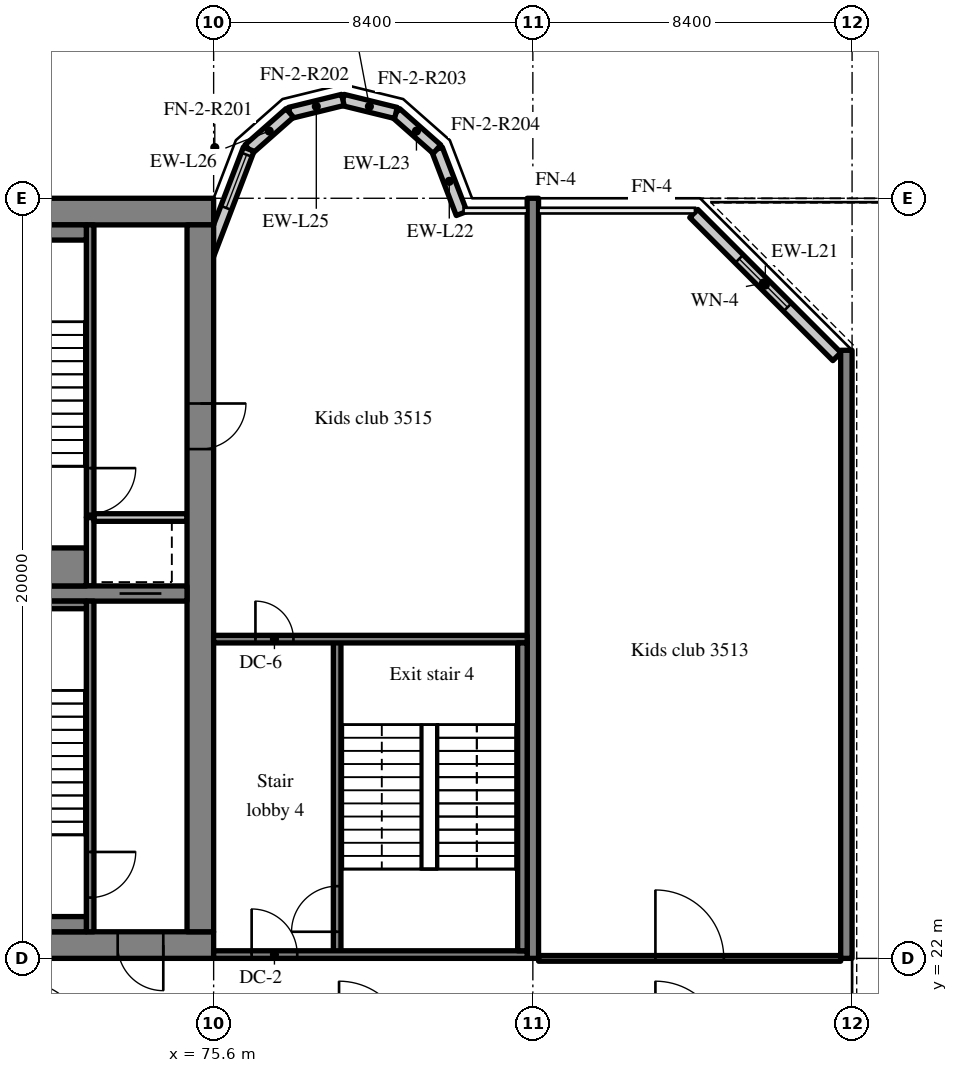
"""IFC4 building model, lengths in metres.
Left out: names, types, materials, properties, quantities, classifications, styles, units other than length and angle.
Written with IfcOpenShell. Run it as: python <this file> out.ifc"""

import sys

from ifc_helpers import new_model, si_unit, direction, frame, frame_2d, origin, place, context, subcontext, project, spatial, rectangle, extrude, source, transform, mapped, element, fill, save


model = new_model("IFC4")
c1 = context("Model", 3, precision=1e-05, world=origin(), true_north=direction((0.0, 1.0)))
c2 = subcontext(c1, "Body", "Model", "MODEL_VIEW")
j1 = project(units=[si_unit("LENGTHUNIT", "METRE"), si_unit("PLANEANGLEUNIT", "RADIAN")], contexts=[c1])
p1 = place(None, origin())
s1 = spatial("IfcSite", under=j1, at=p1, CompositionType="ELEMENT")
p2 = place(p1, origin())
s2 = spatial("IfcBuilding", under=s1, at=p2, CompositionType="ELEMENT")
p3 = place(p2, frame((0.0, 0.0, 146.2)))
s3 = spatial("IfcBuildingStorey", under=s2, at=p3, CompositionType="ELEMENT", Elevation=146.2)
m1 = source(origin(), c2, "Body", "SweptSolid", [
    extrude(rectangle(XDim=50.4, YDim=0.7, at=frame_2d((25.2, 0.0))), origin(), (0.0, 0.0, 1.0), 5.12),
])
p4 = place(p3, frame((25.2, 22.35, 0.0), z_axis=(0.0, 0.0, 1.0), x_axis=(1.0, 0.0, 0.0)))
e1 = element("IfcWall", 1, at=p4, inside=s3, PredefinedType="SHEAR", context=c2, shape_type="MappedRepresentation", body=[
    mapped(m1, transform((0.0, 0.0, 0.0), scale=1.0)),
])
m2 = source(origin(), c2, "Body", "SweptSolid", [
    extrude(rectangle(XDim=1.8, YDim=2.1, at=frame_2d((0.9, 1.05))), frame((0.0, 0.36, 0.0), z_axis=(0.0, -1.0, 0.0), x_axis=(1.0, 0.0, 0.0)), (0.0, 0.0, 1.0), 0.72),
])
p5 = place(p4, frame((15.9, 0.0, 0.0)))
e2 = element("IfcOpeningElement", 2, at=p5, cuts=e1, PredefinedType="OPENING", context=c2, shape_type="MappedRepresentation", body=[
    mapped(m2, transform((0.0, 0.0, 0.0), scale=1.0)),
])
p6 = place(p4, frame((32.7, 0.0, 0.0)))
e3 = element("IfcOpeningElement", 3, at=p6, cuts=e1, PredefinedType="OPENING", context=c2, shape_type="MappedRepresentation", body=[
    mapped(m2, transform((0.0, 0.0, 0.0), scale=1.0)),
])
m3 = source(origin(), c2, "Body", "SweptSolid", [
    extrude(rectangle(XDim=1.2, YDim=2.1, at=frame_2d((0.6, 1.05))), frame((0.0, 0.36, 0.0), z_axis=(0.0, -1.0, 0.0), x_axis=(1.0, 0.0, 0.0)), (0.0, 0.0, 1.0), 0.72),
])
p7 = place(p4, frame((6.475, 0.0, 0.0)))
e4 = element("IfcOpeningElement", 4, at=p7, cuts=e1, PredefinedType="OPENING", context=c2, shape_type="MappedRepresentation", body=[
    mapped(m3, transform((0.0, 0.0, 0.0), scale=1.0)),
])
p8 = place(p4, frame((47.875, 0.0, 0.0)))
e5 = element("IfcOpeningElement", 5, at=p8, cuts=e1, PredefinedType="OPENING", context=c2, shape_type="MappedRepresentation", body=[
    mapped(m3, transform((0.0, 0.0, 0.0), scale=1.0)),
])
p9 = place(p3, frame((25.2, 41.65, 0.0), z_axis=(0.0, 0.0, 1.0), x_axis=(1.0, 0.0, 0.0)))
e6 = element("IfcWall", 6, at=p9, inside=s3, PredefinedType="SHEAR", context=c2, shape_type="MappedRepresentation", body=[
    mapped(m1, transform((0.0, 0.0, 0.0), scale=1.0)),
])
m4 = source(origin(), c2, "Body", "SweptSolid", [
    extrude(rectangle(XDim=18.6, YDim=0.7, at=frame_2d((9.3, 0.0))), origin(), (0.0, 0.0, 1.0), 5.12),
])
p10 = place(p3, frame((75.25, 22.7, 0.0), z_axis=(0.0, 0.0, 1.0), x_axis=(0.0, 1.0, 0.0)))
e7 = element("IfcWall", 7, at=p10, inside=s3, PredefinedType="SHEAR", context=c2, shape_type="MappedRepresentation", body=[
    mapped(m4, transform((0.0, 0.0, 0.0), scale=1.0)),
])
p11 = place(p10, frame((12.7, 0.0, 0.0)))
e8 = element("IfcOpeningElement", 8, at=p11, cuts=e7, PredefinedType="OPENING", context=c2, shape_type="MappedRepresentation", body=[
    mapped(m3, transform((0.0, 0.0, 0.0), scale=1.0)),
])
m5 = source(origin(), c2, "Body", "SweptSolid", [
    extrude(rectangle(XDim=7.5, YDim=0.4, at=frame_2d((3.75, 0.0))), origin(), (0.0, 0.0, 1.0), 5.12),
])
p12 = place(p3, frame((67.4, 31.6, 0.0), z_axis=(0.0, 0.0, 1.0), x_axis=(1.0, 0.0, 0.0)))
e9 = element("IfcWall", 9, at=p12, inside=s3, PredefinedType="SHEAR", context=c2, shape_type="MappedRepresentation", body=[
    mapped(m5, transform((0.0, 0.0, 0.0), scale=1.0)),
])
m6 = source(origin(), c2, "Body", "SweptSolid", [
    extrude(rectangle(XDim=1.1, YDim=2.1, at=frame_2d((0.55, 1.05))), frame((0.0, 0.21, 0.0), z_axis=(0.0, -1.0, 0.0), x_axis=(1.0, 0.0, 0.0)), (0.0, 0.0, 1.0), 0.42),
])
p13 = place(p12, frame((5.725, 0.0, 0.0)))
e10 = element("IfcOpeningElement", 10, at=p13, cuts=e9, PredefinedType="OPENING", context=c2, shape_type="MappedRepresentation", body=[
    mapped(m6, transform((0.0, 0.0, 0.0), scale=1.0)),
])
m7 = source(origin(), c2, "Body", "SweptSolid", [
    extrude(rectangle(XDim=20.0, YDim=0.3, at=frame_2d((10.0, 0.0))), origin(), (0.0, 0.0, 1.0), 5.12),
])
p14 = place(p3, frame((84.0, 22.0, 0.0), z_axis=(0.0, 0.0, 1.0), x_axis=(0.0, 1.0, 0.0)))
e11 = element("IfcWall", 11, at=p14, inside=s3, PredefinedType="SHEAR", context=c2, shape_type="MappedRepresentation", body=[
    mapped(m7, transform((0.0, 0.0, 0.0), scale=1.0)),
])
m8 = source(origin(), c2, "Body", "SweptSolid", [
    extrude(rectangle(XDim=16.0, YDim=0.3, at=frame_2d((8.0, 0.0))), origin(), (0.0, 0.0, 1.0), 5.12),
])
p15 = place(p3, frame((92.25, 22.0, 0.0), z_axis=(0.0, 0.0, 1.0), x_axis=(0.0, 1.0, 0.0)))
e12 = element("IfcWall", 12, at=p15, inside=s3, PredefinedType="SHEAR", context=c2, shape_type="MappedRepresentation", body=[
    mapped(m8, transform((0.0, 0.0, 0.0), scale=1.0)),
])
m9 = source(origin(), c2, "Body", "SweptSolid", [
    extrude(rectangle(XDim=5.326, YDim=0.3, at=frame_2d((2.663, 0.0))), origin(), (0.0, 0.0, 1.0), 5.12),
])
p16 = place(p3, frame((92.0, 37.834, 0.0), z_axis=(0.0, 0.0, 1.0), x_axis=(-0.707083859269, 0.707129702361, 0.0)))
e13 = element("IfcWall", 13, at=p16, inside=s3, PredefinedType="SOLIDWALL", context=c2, shape_type="MappedRepresentation", body=[
    mapped(m9, transform((0.0, 0.0, 0.0), scale=1.0)),
])
m10 = source(origin(), c2, "Body", "SweptSolid", [
    extrude(rectangle(XDim=1.8, YDim=1.5, at=frame_2d((0.9, 0.75))), frame((0.0, 0.16, 0.0), z_axis=(0.0, -1.0, 0.0), x_axis=(1.0, 0.0, 0.0)), (0.0, 0.0, 1.0), 0.32),
])
p17 = place(p16, frame((1.836, 0.0, 0.9)))
e14 = element("IfcOpeningElement", 14, at=p17, cuts=e13, PredefinedType="OPENING", context=c2, shape_type="MappedRepresentation", body=[
    mapped(m10, transform((0.0, 0.0, 0.0), scale=1.0)),
])
m11 = source(origin(), c2, "Body", "SweptSolid", [
    extrude(rectangle(XDim=1.812, YDim=0.3, at=frame_2d((0.906, 0.0))), origin(), (0.0, 0.0, 1.0), 5.12),
])
p18 = place(p3, frame((82.125, 41.6, 0.0), z_axis=(0.0, 0.0, 1.0), x_axis=(-0.357877270961, 0.93376863244, 0.0)))
e15 = element("IfcWall", 15, at=p18, inside=s3, PredefinedType="SOLIDWALL", context=c2, shape_type="MappedRepresentation", body=[
    mapped(m11, transform((0.0, 0.0, 0.0), scale=1.0)),
])
m12 = source(origin(), c2, "Body", "SweptSolid", [
    extrude(rectangle(XDim=1.44, YDim=0.3, at=frame_2d((0.72, 0.0))), origin(), (0.0, 0.0, 1.0), 5.12),
])
p19 = place(p3, frame((81.477, 43.292, 0.0), z_axis=(0.0, 0.0, 1.0), x_axis=(-0.74957555648, 0.661918790432, 0.0)))
e16 = element("IfcWall", 16, at=p19, inside=s3, PredefinedType="SOLIDWALL", context=c2, shape_type="MappedRepresentation", body=[
    mapped(m12, transform((0.0, 0.0, 0.0), scale=1.0)),
])
m13 = source(origin(), c2, "Body", "SweptSolid", [
    extrude(rectangle(XDim=1.439, YDim=0.3, at=frame_2d((0.719, 0.0))), origin(), (0.0, 0.0, 1.0), 5.12),
])
for number, where, z_axis, x_axis in (
    (17, (80.397, 44.245, 0.0), (0.0, 0.0, 1.0), (-0.971, 0.238, 0.0)),
    (18, (79.0, 44.588, 0.0), (0.0, 0.0, 1.0), (-0.971, -0.238, 0.0)),
):
    element("IfcWall", number, at=place(p3, frame(where, z_axis=z_axis, x_axis=x_axis)), inside=s3, PredefinedType="SOLIDWALL", context=c2, shape_type="MappedRepresentation", body=[
        mapped(m13, transform((0.0, 0.0, 0.0), scale=1.0)),
    ])
p20 = place(p3, frame((77.603, 44.245, 0.0), z_axis=(0.0, 0.0, 1.0), x_axis=(-0.74957555648, -0.661918790432, 0.0)))
e19 = element("IfcWall", 19, at=p20, inside=s3, PredefinedType="SOLIDWALL", context=c2, shape_type="MappedRepresentation", body=[
    mapped(m12, transform((0.0, 0.0, 0.0), scale=1.0)),
])
m14 = source(origin(), c2, "Body", "SweptSolid", [
    extrude(rectangle(XDim=3.559, YDim=0.3, at=frame_2d((1.78, 0.0))), origin(), (0.0, 0.0, 1.0), 5.12),
])
p21 = place(p3, frame((76.523, 43.292, 0.0), z_axis=(0.0, 0.0, 1.0), x_axis=(-0.35779745313, -0.933799219604, 0.0)))
e20 = element("IfcWall", 20, at=p21, inside=s3, PredefinedType="SOLIDWALL", context=c2, shape_type="MappedRepresentation", body=[
    mapped(m14, transform((0.0, 0.0, 0.0), scale=1.0)),
])
m15 = source(origin(), c2, "Body", "SweptSolid", [
    extrude(rectangle(XDim=1.5, YDim=2.0, at=frame_2d((0.75, 1.0))), frame((0.0, 0.16, 0.0), z_axis=(0.0, -1.0, 0.0), x_axis=(1.0, 0.0, 0.0)), (0.0, 0.0, 1.0), 0.32),
])
p22 = place(p21, frame((0.156, 0.0, 0.9)))
e21 = element("IfcOpeningElement", 21, at=p22, cuts=e20, PredefinedType="OPENING", context=c2, shape_type="MappedRepresentation", body=[
    mapped(m15, transform((0.0, 0.0, 0.0), scale=1.0)),
])
m16 = source(origin(), c2, "Body", "SweptSolid", [
    extrude(rectangle(XDim=8.7, YDim=0.2, at=frame_2d((4.35, 0.0))), origin(), (0.0, 0.0, 1.0), 5.12),
])
p23 = place(p3, frame((72.35, 22.7, 0.0), z_axis=(0.0, 0.0, 1.0), x_axis=(0.0, 1.0, 0.0)))
e22 = element("IfcWall", 22, at=p23, inside=s3, PredefinedType="SOLIDWALL", context=c2, shape_type="MappedRepresentation", body=[
    mapped(m16, transform((0.0, 0.0, 0.0), scale=1.0)),
])
m17 = source(origin(), c2, "Body", "SweptSolid", [
    extrude(rectangle(XDim=1.2, YDim=2.1, at=frame_2d((0.6, 1.05))), frame((0.0, 0.11, 0.0), z_axis=(0.0, -1.0, 0.0), x_axis=(1.0, 0.0, 0.0)), (0.0, 0.0, 1.0), 0.22),
])
p24 = place(p23, frame((0.9, 0.0, 0.0)))
e23 = element("IfcOpeningElement", 23, at=p24, cuts=e22, PredefinedType="OPENING", context=c2, shape_type="MappedRepresentation", body=[
    mapped(m17, transform((0.0, 0.0, 0.0), scale=1.0)),
])
m18 = source(origin(), c2, "Body", "SweptSolid", [
    extrude(rectangle(XDim=1.8, YDim=0.2, at=frame_2d((0.9, 0.0))), origin(), (0.0, 0.0, 1.0), 5.12),
])
p25 = place(p3, frame((72.35, 31.8, 0.0), z_axis=(0.0, 0.0, 1.0), x_axis=(0.0, 1.0, 0.0)))
e24 = element("IfcWall", 24, at=p25, inside=s3, PredefinedType="SOLIDWALL", context=c2, shape_type="MappedRepresentation", body=[
    mapped(m18, transform((0.0, 0.0, 0.0), scale=1.0)),
])
m19 = source(origin(), c2, "Body", "SweptSolid", [
    extrude(rectangle(XDim=2.45, YDim=0.2, at=frame_2d((1.225, 0.0))), origin(), (0.0, 0.0, 1.0), 5.12),
])
p26 = place(p3, frame((72.45, 33.6, 0.0), z_axis=(0.0, 0.0, 1.0), x_axis=(1.0, 0.0, 0.0)))
e25 = element("IfcWall", 25, at=p26, inside=s3, PredefinedType="SOLIDWALL", context=c2, shape_type="MappedRepresentation", body=[
    mapped(m19, transform((0.0, 0.0, 0.0), scale=1.0)),
])
m20 = source(origin(), c2, "Body", "SweptSolid", [
    extrude(rectangle(XDim=7.7, YDim=0.2, at=frame_2d((3.85, 0.0))), origin(), (0.0, 0.0, 1.0), 5.12),
])
p27 = place(p3, frame((72.35, 33.6, 0.0), z_axis=(0.0, 0.0, 1.0), x_axis=(0.0, 1.0, 0.0)))
e26 = element("IfcWall", 26, at=p27, inside=s3, PredefinedType="SOLIDWALL", context=c2, shape_type="MappedRepresentation", body=[
    mapped(m20, transform((0.0, 0.0, 0.0), scale=1.0)),
])
p28 = place(p27, frame((0.1, 0.0, 0.0)))
e27 = element("IfcOpeningElement", 27, at=p28, cuts=e26, PredefinedType="OPENING", context=c2, shape_type="MappedRepresentation", body=[
    mapped(m17, transform((0.0, 0.0, 0.0), scale=1.0)),
])
m21 = source(origin(), c2, "Body", "SweptSolid", [
    extrude(rectangle(XDim=8.3, YDim=0.2, at=frame_2d((4.15, 0.0))), origin(), (0.0, 0.0, 1.0), 5.12),
])
p29 = place(p3, frame((78.85, 22.1, 0.0), z_axis=(0.0, 0.0, 1.0), x_axis=(0.0, 1.0, 0.0)))
e28 = element("IfcWall", 28, at=p29, inside=s3, PredefinedType="SOLIDWALL", context=c2, shape_type="MappedRepresentation", body=[
    mapped(m21, transform((0.0, 0.0, 0.0), scale=1.0)),
])
p30 = place(p29, frame((0.6, 0.0, 0.0)))
e29 = element("IfcOpeningElement", 29, at=p30, cuts=e28, PredefinedType="OPENING", context=c2, shape_type="MappedRepresentation", body=[
    mapped(m17, transform((0.0, 0.0, 0.0), scale=1.0)),
])
m22 = source(origin(), c2, "Body", "SweptSolid", [
    extrude(rectangle(XDim=8.25, YDim=0.2, at=frame_2d((4.125, 0.0))), origin(), (0.0, 0.0, 1.0), 5.12),
])
p31 = place(p3, frame((83.85, 22.1, 0.0), z_axis=(0.0, 0.0, 1.0), x_axis=(-1.0, 0.0, 0.0)))
e30 = element("IfcWall", 30, at=p31, inside=s3, PredefinedType="SOLIDWALL", context=c2, shape_type="MappedRepresentation", body=[
    mapped(m22, transform((0.0, 0.0, 0.0), scale=1.0)),
])
p32 = place(p31, frame((6.05, 0.0, 0.0)))
e31 = element("IfcOpeningElement", 31, at=p32, cuts=e30, PredefinedType="OPENING", context=c2, shape_type="MappedRepresentation", body=[
    mapped(m17, transform((0.0, 0.0, 0.0), scale=1.0)),
])
p33 = place(p3, frame((83.85, 30.4, 0.0), z_axis=(0.0, 0.0, 1.0), x_axis=(-1.0, 0.0, 0.0)))
e32 = element("IfcWall", 32, at=p33, inside=s3, PredefinedType="SOLIDWALL", context=c2, shape_type="MappedRepresentation", body=[
    mapped(m22, transform((0.0, 0.0, 0.0), scale=1.0)),
])
m23 = source(origin(), c2, "Body", "SweptSolid", [
    extrude(rectangle(XDim=1.0, YDim=2.1, at=frame_2d((0.5, 1.05))), frame((0.0, 0.11, 0.0), z_axis=(0.0, -1.0, 0.0), x_axis=(1.0, 0.0, 0.0)), (0.0, 0.0, 1.0), 0.22),
])
p34 = place(p33, frame((6.15, 0.0, 0.0)))
e33 = element("IfcOpeningElement", 33, at=p34, cuts=e32, PredefinedType="OPENING", context=c2, shape_type="MappedRepresentation", body=[
    mapped(m23, transform((0.0, 0.0, 0.0), scale=1.0)),
])
m24 = source(origin(), c2, "Body", "SweptSolid", [
    extrude(rectangle(XDim=4.85, YDim=0.4, at=frame_2d((2.425, 0.0))), origin(), (0.0, 0.0, 1.0), 5.12),
])
p35 = place(p3, frame((67.4, 22.9, 0.0), z_axis=(0.0, 0.0, 1.0), x_axis=(1.0, 0.0, 0.0)))
e34 = element("IfcWall", 34, at=p35, inside=s3, PredefinedType="SOLIDWALL", context=c2, shape_type="MappedRepresentation", body=[
    mapped(m24, transform((0.0, 0.0, 0.0), scale=1.0)),
])
m25 = source(origin(), c2, "Body", "SweptSolid", [
    extrude(rectangle(XDim=4.85, YDim=0.2, at=frame_2d((2.425, 0.0))), origin(), (0.0, 0.0, 1.0), 5.12),
])
p36 = place(p3, frame((67.4, 31.3, 0.0), z_axis=(0.0, 0.0, 1.0), x_axis=(1.0, 0.0, 0.0)))
e35 = element("IfcWall", 35, at=p36, inside=s3, PredefinedType="SOLIDWALL", context=c2, shape_type="MappedRepresentation", body=[
    mapped(m25, transform((0.0, 0.0, 0.0), scale=1.0)),
])
p37 = place(p3, frame((67.4, 41.1, 0.0), z_axis=(0.0, 0.0, 1.0), x_axis=(1.0, 0.0, 0.0)))
e36 = element("IfcWall", 36, at=p37, inside=s3, PredefinedType="SOLIDWALL", context=c2, shape_type="MappedRepresentation", body=[
    mapped(m24, transform((0.0, 0.0, 0.0), scale=1.0)),
])
m26 = source(origin(), c2, "Body", "SweptSolid", [
    extrude(rectangle(XDim=4.85, YDim=1.0, at=frame_2d((2.425, 0.0))), origin(), (0.0, 0.0, 1.0), 5.12),
])
p38 = place(p3, frame((67.4, 32.3, 0.0), z_axis=(0.0, 0.0, 1.0), x_axis=(1.0, 0.0, 0.0)))
e37 = element("IfcWall", 37, at=p38, inside=s3, PredefinedType="SOLIDWALL", context=c2, shape_type="MappedRepresentation", body=[
    mapped(m26, transform((0.0, 0.0, 0.0), scale=1.0)),
])
m27 = source(origin(), c2, "Body", "SweptSolid", [
    extrude(rectangle(XDim=8.1, YDim=0.25, at=frame_2d((4.05, 0.0))), origin(), (0.0, 0.0, 1.0), 5.12),
])
p39 = place(p3, frame((83.725, 22.2, 0.0), z_axis=(0.0, 0.0, 1.0), x_axis=(0.0, 1.0, 0.0)))
e38 = element("IfcWall", 38, at=p39, inside=s3, PredefinedType="SOLIDWALL", context=c2, shape_type="MappedRepresentation", body=[
    mapped(m27, transform((0.0, 0.0, 0.0), scale=1.0)),
])
m28 = source(origin(), c2, "Body", "SweptSolid", [
    extrude(rectangle(XDim=7.95, YDim=0.15, at=frame_2d((3.975, 0.0))), origin(), (0.0, 0.0, 1.0), 4.42),
])
p40 = place(p3, frame((84.15, 22.0, 0.0), z_axis=(0.0, 0.0, 1.0), x_axis=(1.0, 0.0, 0.0)))
e39 = element("IfcWall", 39, at=p40, inside=s3, PredefinedType="PARTITIONING", context=c2, shape_type="MappedRepresentation", body=[
    mapped(m28, transform((0.0, 0.0, 0.0), scale=1.0)),
])
m29 = source(origin(), c2, "Body", "SweptSolid", [
    extrude(rectangle(XDim=1.8, YDim=2.1, at=frame_2d((0.9, 1.05))), frame((0.0, 0.085, 0.0), z_axis=(0.0, -1.0, 0.0), x_axis=(1.0, 0.0, 0.0)), (0.0, 0.0, 1.0), 0.17),
])
p41 = place(p40, frame((3.075, 0.0, 0.0)))
e40 = element("IfcOpeningElement", 40, at=p41, cuts=e39, PredefinedType="OPENING", context=c2, shape_type="MappedRepresentation", body=[
    mapped(m29, transform((0.0, 0.0, 0.0), scale=1.0)),
])
m30 = source(origin(), c2, "Body", "SweptSolid", [
    extrude(rectangle(XDim=1.8, YDim=1.5, at=frame_2d((0.9, 0.75))), frame((0.0, 0.03, 0.0), z_axis=(0.0, -1.0, 0.0), x_axis=(1.0, 0.0, 0.0)), (0.0, 0.0, 1.0), 0.06),
])
p42 = place(p17, origin())
e41 = element("IfcWindow", 41, at=p42, inside=s3, PartitioningType="SINGLE_PANEL", PredefinedType="WINDOW", context=c2, shape_type="MappedRepresentation", body=[
    mapped(m30, transform((0.0, 0.0, 0.0), scale=1.0)),
])
fill(e14, e41)
m31 = source(origin(), c2, "Body", "SweptSolid", [
    extrude(rectangle(XDim=1.5, YDim=2.0, at=frame_2d((0.75, 1.0))), frame((0.0, 0.03, 0.0), z_axis=(0.0, -1.0, 0.0), x_axis=(1.0, 0.0, 0.0)), (0.0, 0.0, 1.0), 0.06),
])
p43 = place(p22, origin())
e42 = element("IfcWindow", 42, at=p43, inside=s3, PartitioningType="SINGLE_PANEL", PredefinedType="WINDOW", context=c2, shape_type="MappedRepresentation", body=[
    mapped(m31, transform((0.0, 0.0, 0.0), scale=1.0)),
])
fill(e21, e42)
m32 = source(origin(), c2, "Body", "SweptSolid", [
    extrude(rectangle(XDim=1.2, YDim=2.1, at=frame_2d((0.6, 1.05))), frame((0.0, 0.025, 0.0), z_axis=(0.0, -1.0, 0.0), x_axis=(1.0, 0.0, 0.0)), (0.0, 0.0, 1.0), 0.05),
])
p44 = place(p24, origin())
e43 = element("IfcDoor", 43, at=p44, inside=s3, OperationType="SINGLE_SWING_RIGHT", PredefinedType="DOOR", context=c2, shape_type="MappedRepresentation", body=[
    mapped(m32, transform((0.0, 0.0, 0.0), scale=1.0)),
])
fill(e23, e43)
m33 = source(origin(), c2, "Body", "SweptSolid", [
    extrude(rectangle(XDim=1.2, YDim=2.1, at=frame_2d((0.6, 1.05))), frame((0.0, 0.275, 0.0), z_axis=(0.0, -1.0, 0.0), x_axis=(1.0, 0.0, 0.0)), (0.0, 0.0, 1.0), 0.05),
])
p45 = place(p8, origin())
e44 = element("IfcDoor", 44, at=p45, inside=s3, OperationType="SINGLE_SWING_RIGHT", PredefinedType="DOOR", context=c2, shape_type="MappedRepresentation", body=[
    mapped(m33, transform((0.0, 0.0, 0.0), scale=1.0)),
])
fill(e5, e44)
m34 = source(origin(), c2, "Body", "SweptSolid", [
    extrude(rectangle(XDim=1.1, YDim=2.1, at=frame_2d((0.55, 1.05))), frame((0.0, 0.025, 0.0), z_axis=(0.0, -1.0, 0.0), x_axis=(1.0, 0.0, 0.0)), (0.0, 0.0, 1.0), 0.05),
])
p46 = place(p13, origin())
e45 = element("IfcDoor", 45, at=p46, inside=s3, OperationType="SLIDING_TO_RIGHT", PredefinedType="DOOR", context=c2, shape_type="MappedRepresentation", body=[
    mapped(m34, transform((0.0, 0.0, 0.0), scale=1.0)),
])
fill(e10, e45)
p47 = place(p28, origin())
e46 = element("IfcDoor", 46, at=p47, inside=s3, OperationType="SINGLE_SWING_RIGHT", PredefinedType="DOOR", context=c2, shape_type="MappedRepresentation", body=[
    mapped(m32, transform((0.0, 0.0, 0.0), scale=1.0)),
])
fill(e27, e46)
p48 = place(p11, origin())
e47 = element("IfcDoor", 47, at=p48, inside=s3, OperationType="SINGLE_SWING_RIGHT", PredefinedType="DOOR", context=c2, shape_type="MappedRepresentation", body=[
    mapped(m32, transform((0.0, 0.0, 0.0), scale=1.0)),
])
fill(e8, e47)
p49 = place(p30, origin())
e48 = element("IfcDoor", 48, at=p49, inside=s3, OperationType="SINGLE_SWING_LEFT", PredefinedType="DOOR", context=c2, shape_type="MappedRepresentation", body=[
    mapped(m32, transform((0.0, 0.0, 0.0), scale=1.0)),
])
fill(e29, e48)
p50 = place(p32, origin())
e49 = element("IfcDoor", 49, at=p50, inside=s3, OperationType="SINGLE_SWING_RIGHT", PredefinedType="DOOR", context=c2, shape_type="MappedRepresentation", body=[
    mapped(m32, transform((0.0, 0.0, 0.0), scale=1.0)),
])
fill(e31, e49)
m35 = source(origin(), c2, "Body", "SweptSolid", [
    extrude(rectangle(XDim=1.0, YDim=2.1, at=frame_2d((0.5, 1.05))), frame((0.0, 0.025, 0.0), z_axis=(0.0, -1.0, 0.0), x_axis=(1.0, 0.0, 0.0)), (0.0, 0.0, 1.0), 0.05),
])
p51 = place(p34, origin())
e50 = element("IfcDoor", 50, at=p51, inside=s3, OperationType="SINGLE_SWING_RIGHT", PredefinedType="DOOR", context=c2, shape_type="MappedRepresentation", body=[
    mapped(m35, transform((0.0, 0.0, 0.0), scale=1.0)),
])
fill(e33, e50)
m36 = source(origin(), c2, "Body", "SweptSolid", [
    extrude(rectangle(XDim=1.8, YDim=2.1, at=frame_2d((0.9, 1.05))), frame((0.0, 0.025, 0.0), z_axis=(0.0, -1.0, 0.0), x_axis=(1.0, 0.0, 0.0)), (0.0, 0.0, 1.0), 0.05),
])
p52 = place(p41, origin())
e51 = element("IfcDoor", 51, at=p52, inside=s3, OperationType="DOUBLE_DOOR_SINGLE_SWING", PredefinedType="DOOR", context=c2, shape_type="MappedRepresentation", body=[
    mapped(m36, transform((0.0, 0.0, 0.0), scale=1.0)),
])
fill(e40, e51)
save(model, sys.argv[1])
